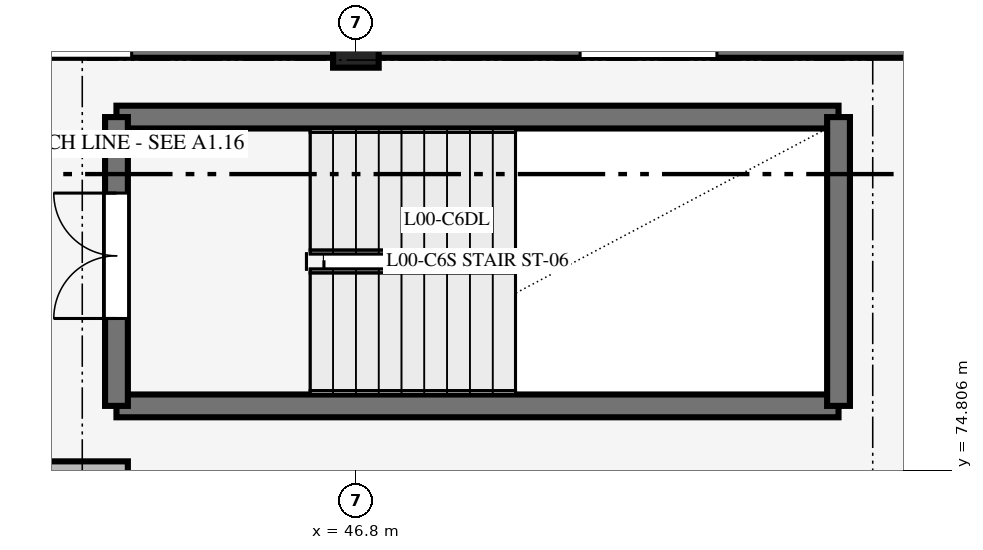
"""IFC4 building model, lengths in metres.
Left out: names, types, materials, properties, quantities, classifications, styles, units other than length and angle.
Written with IfcOpenShell. Run it as: python <this file> out.ifc"""

import sys

from ifc_helpers import new_model, si_unit, direction, frame, frame_2d, origin, origin_2d, place, context, subcontext, project, spatial, rectangle, extrude, element, fill, save


model = new_model("IFC4")
c1 = context("Model", 3, precision=1e-05, world=origin(), true_north=direction((0.0, 1.0)))
c2 = subcontext(c1, "Body", "Model", "MODEL_VIEW")
j1 = project(units=[si_unit("LENGTHUNIT", "METRE"), si_unit("PLANEANGLEUNIT", "RADIAN")], contexts=[c1])
p1 = place(None, origin())
s1 = spatial("IfcSite", under=j1, at=p1, CompositionType="ELEMENT")
p2 = place(p1, origin())
s2 = spatial("IfcBuilding", under=s1, at=p2, CompositionType="ELEMENT")
p3 = place(p2, origin())
s3 = spatial("IfcBuildingStorey", under=s2, at=p3, CompositionType="ELEMENT", Elevation=0.0)
p4 = place(p3, frame((46.8, 80.4, 0.0), z_axis=(0.0, 0.0, 1.0), x_axis=(1.0, 0.0, 0.0)))
e1 = element("IfcColumn", 1, at=p4, inside=s3, PredefinedType="COLUMN", context=c2, shape_type="SweptSolid", body=[
    extrude(rectangle(XDim=0.6, YDim=0.6, at=origin_2d()), origin(), (0.0, 0.0, 1.0), 6.0),
])
for number, where, z_axis, x_axis in (
    (2, (53.15, 75.65, 0.0), (0.0, 0.0, 1.0), (-1.0, 0.0, 0.0)),
    (3, (43.65, 79.45, 0.0), (0.0, 0.0, 1.0), (1.0, 0.0, 0.0)),
):
    element("IfcWall", number, at=place(p3, frame(where, z_axis=z_axis, x_axis=x_axis)), inside=s3, PredefinedType="SHEAR", context=c2, shape_type="SweptSolid", body=[
        extrude(rectangle(XDim=9.5, YDim=0.3, at=frame_2d((4.75, 0.0))), origin(), (0.0, 0.0, 1.0), 6.0),
    ])
p5 = place(p3, frame((43.65, 75.65, 0.0), z_axis=(0.0, 0.0, 1.0), x_axis=(0.0, 1.0, 0.0)))
e4 = element("IfcWall", 4, at=p5, inside=s3, PredefinedType="SHEAR", context=c2, shape_type="SweptSolid", body=[
    extrude(rectangle(XDim=3.8, YDim=0.3, at=frame_2d((1.9, 0.0))), origin(), (0.0, 0.0, 1.0), 6.0),
])
p6 = place(p5, frame((1.15, 0.0, 0.0)))
e5 = element("IfcOpeningElement", 5, at=p6, cuts=e4, PredefinedType="OPENING", context=c2, shape_type="SweptSolid", body=[
    extrude(rectangle(XDim=1.65, YDim=2.2, at=frame_2d((0.825, 1.1))), frame((0.0, 0.16, 0.0), z_axis=(0.0, -1.0, 0.0), x_axis=(1.0, 0.0, 0.0)), (0.0, 0.0, 1.0), 0.32),
])
p7 = place(p3, frame((53.15, 75.65, 0.0), z_axis=(0.0, 0.0, 1.0), x_axis=(0.0, 1.0, 0.0)))
e6 = element("IfcWall", 6, at=p7, inside=s3, PredefinedType="SHEAR", context=c2, shape_type="SweptSolid", body=[
    extrude(rectangle(XDim=3.8, YDim=0.3, at=frame_2d((1.9, 0.0))), origin(), (0.0, 0.0, 1.0), 6.0),
])
p8 = place(p3, frame((39.29, 80.4, 0.0), z_axis=(0.0, 0.0, 1.0), x_axis=(1.0, 0.0, 0.0)))
e7 = element("IfcWall", 7, at=p8, inside=s3, PredefinedType="STANDARD", context=c2, shape_type="SweptSolid", body=[
    extrude(rectangle(XDim=7.22, YDim=0.34, at=frame_2d((3.61, 0.0))), origin(), (0.0, 0.0, 1.0), 5.66),
])
p9 = place(p8, frame((2.56, 0.0, 2.2)))
e8 = element("IfcOpeningElement", 8, at=p9, cuts=e7, PredefinedType="OPENING", context=c2, shape_type="SweptSolid", body=[
    extrude(rectangle(XDim=2.0, YDim=0.9, at=frame_2d((1.0, 0.45))), frame((0.0, 0.18, 0.0), z_axis=(0.0, -1.0, 0.0), x_axis=(1.0, 0.0, 0.0)), (0.0, 0.0, 1.0), 0.36),
])
p10 = place(p3, frame((47.09, 80.4, 0.0), z_axis=(0.0, 0.0, 1.0), x_axis=(1.0, 0.0, 0.0)))
e9 = element("IfcWall", 9, at=p10, inside=s3, PredefinedType="STANDARD", context=c2, shape_type="SweptSolid", body=[
    extrude(rectangle(XDim=7.585, YDim=0.34, at=frame_2d((3.792, 0.0))), origin(), (0.0, 0.0, 1.0), 5.66),
])
p11 = place(p10, frame((2.66, 0.0, 0.0)))
e10 = element("IfcOpeningElement", 10, at=p11, cuts=e9, PredefinedType="OPENING", context=c2, shape_type="SweptSolid", body=[
    extrude(rectangle(XDim=1.8, YDim=2.25, at=frame_2d((0.9, 1.125))), frame((0.0, 0.18, 0.0), z_axis=(0.0, -1.0, 0.0), x_axis=(1.0, 0.0, 0.0)), (0.0, 0.0, 1.0), 0.36),
])
p12 = place(p3, frame((41.5, 74.8, 0.0), z_axis=(0.0, 0.0, 1.0), x_axis=(1.0, 0.0, 0.0)))
e11 = element("IfcWall", 11, at=p12, inside=s3, PredefinedType="STANDARD", context=c2, shape_type="SweptSolid", body=[
    extrude(rectangle(XDim=2.3, YDim=0.24, at=frame_2d((1.15, 0.0))), origin(), (0.0, 0.0, 1.0), 3.05),
])
p13 = place(p6, origin())
e12 = element("IfcDoor", 12, at=p13, inside=s3, OperationType="DOUBLE_DOOR_SINGLE_SWING", PredefinedType="DOOR", context=c2, shape_type="SweptSolid", body=[
    extrude(rectangle(XDim=1.65, YDim=2.2, at=frame_2d((0.825, 1.1))), frame((0.0, 0.025, 0.0), z_axis=(0.0, -1.0, 0.0), x_axis=(1.0, 0.0, 0.0)), (0.0, 0.0, 1.0), 0.05),
])
fill(e5, e12)
save(model, sys.argv[1])
